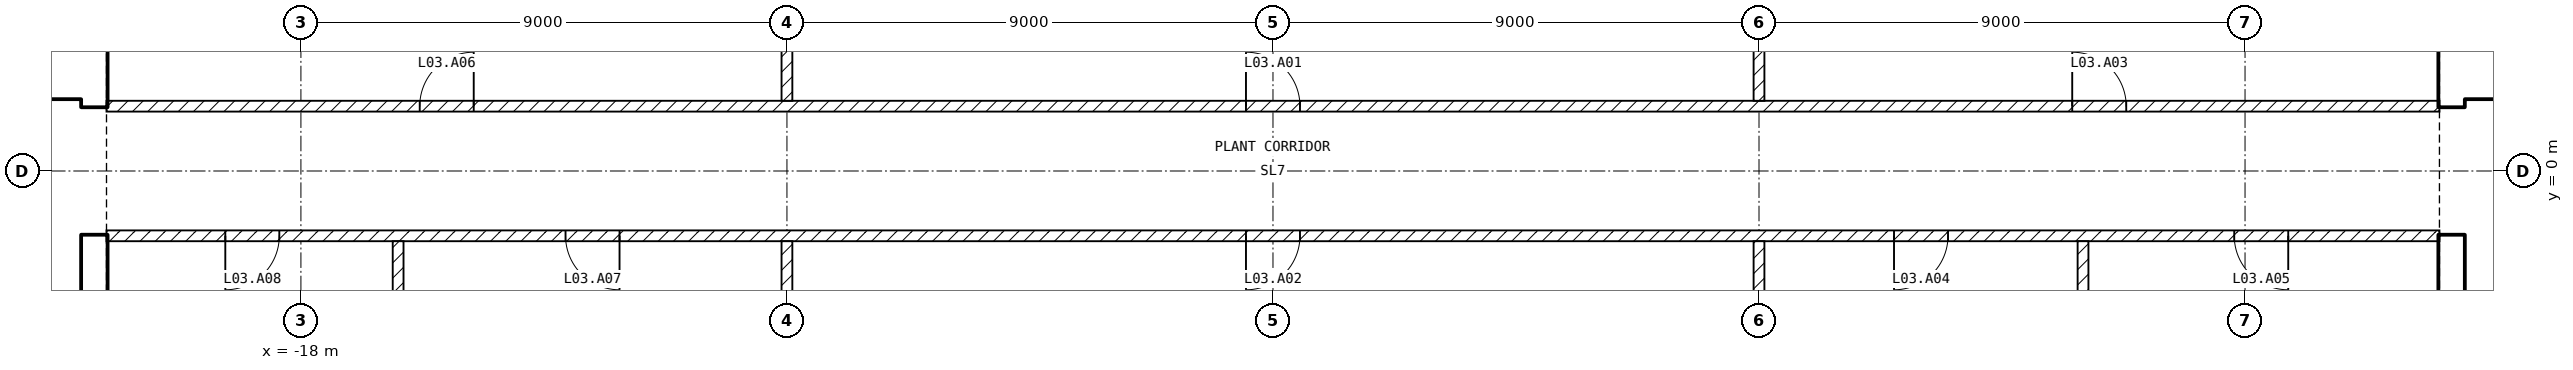
"""IFC4 building model, lengths in metres.
Left out: names, types, materials, properties, quantities, classifications, styles, units other than length and angle.
Written with IfcOpenShell. Run it as: python <this file> out.ifc"""

import sys

from ifc_helpers import new_model, si_unit, direction, frame, frame_2d, origin, place, context, subcontext, project, spatial, rectangle, extrude, element, fill, save


model = new_model("IFC4")
c1 = context("Model", 3, precision=1e-05, world=origin(), true_north=direction((0.0, 1.0)))
c2 = subcontext(c1, "Body", "Model", "MODEL_VIEW")
j1 = project(units=[si_unit("LENGTHUNIT", "METRE"), si_unit("PLANEANGLEUNIT", "RADIAN")], contexts=[c1])
p1 = place(None, origin())
s1 = spatial("IfcSite", under=j1, at=p1, CompositionType="ELEMENT")
p2 = place(p1, origin())
s2 = spatial("IfcBuilding", under=s1, at=p2, CompositionType="ELEMENT")
p3 = place(p2, frame((0.0, 0.0, 27.0)))
s3 = spatial("IfcBuildingStorey", under=s2, at=p3, CompositionType="ELEMENT", Elevation=27.0)
for number, where, z_axis, x_axis in (
    (1, (21.825, -8.1, 0.0), (0.0, 0.0, 1.0), (0.0, 1.0, 0.0)),
    (2, (21.825, 1.2, 0.0), (0.0, 0.0, 1.0), (0.0, 1.0, 0.0)),
):
    element("IfcWall", number, at=place(p3, frame(where, z_axis=z_axis, x_axis=x_axis)), inside=s3, PredefinedType="SHEAR", context=c2, shape_type="SweptSolid", body=[
        extrude(rectangle(XDim=6.9, YDim=0.45, at=frame_2d((3.45, 0.0))), origin(), (0.0, 0.0, 1.0), 4.7),
    ])
p4 = place(p3, frame((22.05, 1.45, 0.0), z_axis=(0.0, 0.0, 1.0), x_axis=(1.0, 0.0, 0.0)))
e3 = element("IfcWall", 3, at=p4, inside=s3, PredefinedType="SOLIDWALL", context=c2, shape_type="SweptSolid", body=[
    extrude(rectangle(XDim=13.05, YDim=0.2, at=frame_2d((6.525, 0.0))), origin(), (0.0, 0.0, 1.0), 4.7),
])
p5 = place(p4, frame((0.75, 0.0, 0.0)))
e4 = element("IfcOpeningElement", 4, at=p5, cuts=e3, PredefinedType="OPENING", context=c2, shape_type="SweptSolid", body=[
    extrude(rectangle(XDim=1.0, YDim=2.1, at=frame_2d((0.5, 1.05))), frame((0.0, 0.11, 0.0), z_axis=(0.0, -1.0, 0.0), x_axis=(1.0, 0.0, 0.0)), (0.0, 0.0, 1.0), 0.22),
])
p6 = place(p4, frame((3.25, 0.0, 0.0)))
e5 = element("IfcOpeningElement", 5, at=p6, cuts=e3, PredefinedType="OPENING", context=c2, shape_type="SweptSolid", body=[
    extrude(rectangle(XDim=1.0, YDim=2.1, at=frame_2d((0.5, 1.05))), frame((0.0, 0.11, 0.0), z_axis=(0.0, -1.0, 0.0), x_axis=(1.0, 0.0, 0.0)), (0.0, 0.0, 1.0), 0.22),
])
for number, where, z_axis, x_axis in (
    (6, (-21.825, -8.1, 0.0), (0.0, 0.0, 1.0), (0.0, 1.0, 0.0)),
    (7, (-21.825, 1.2, 0.0), (0.0, 0.0, 1.0), (0.0, 1.0, 0.0)),
):
    element("IfcWall", number, at=place(p3, frame(where, z_axis=z_axis, x_axis=x_axis)), inside=s3, PredefinedType="SHEAR", context=c2, shape_type="SweptSolid", body=[
        extrude(rectangle(XDim=6.9, YDim=0.45, at=frame_2d((3.45, 0.0))), origin(), (0.0, 0.0, 1.0), 4.7),
    ])
p7 = place(p3, frame((-35.1, 1.45, 0.0), z_axis=(0.0, 0.0, 1.0), x_axis=(1.0, 0.0, 0.0)))
e8 = element("IfcWall", 8, at=p7, inside=s3, PredefinedType="SOLIDWALL", context=c2, shape_type="SweptSolid", body=[
    extrude(rectangle(XDim=13.05, YDim=0.2, at=frame_2d((6.525, 0.0))), origin(), (0.0, 0.0, 1.0), 4.7),
])
p8 = place(p7, frame((11.3, 0.0, 0.0)))
e9 = element("IfcOpeningElement", 9, at=p8, cuts=e8, PredefinedType="OPENING", context=c2, shape_type="SweptSolid", body=[
    extrude(rectangle(XDim=1.0, YDim=2.1, at=frame_2d((0.5, 1.05))), frame((0.0, 0.11, 0.0), z_axis=(0.0, -1.0, 0.0), x_axis=(1.0, 0.0, 0.0)), (0.0, 0.0, 1.0), 0.22),
])
p9 = place(p7, frame((8.8, 0.0, 0.0)))
e10 = element("IfcOpeningElement", 10, at=p9, cuts=e8, PredefinedType="OPENING", context=c2, shape_type="SweptSolid", body=[
    extrude(rectangle(XDim=1.0, YDim=2.1, at=frame_2d((0.5, 1.05))), frame((0.0, 0.11, 0.0), z_axis=(0.0, -1.0, 0.0), x_axis=(1.0, 0.0, 0.0)), (0.0, 0.0, 1.0), 0.22),
])
p10 = place(p3, frame((-21.6, 1.2, 0.0), z_axis=(0.0, 0.0, 1.0), x_axis=(1.0, 0.0, 0.0)))
e11 = element("IfcWall", 11, at=p10, inside=s3, PredefinedType="PARTITIONING", context=c2, shape_type="SweptSolid", body=[
    extrude(rectangle(XDim=43.2, YDim=0.2, at=frame_2d((21.6, 0.0))), origin(), (0.0, 0.0, 1.0), 4.7),
])
p11 = place(p10, frame((21.1, 0.0, 0.0)))
e12 = element("IfcOpeningElement", 12, at=p11, cuts=e11, PredefinedType="OPENING", context=c2, shape_type="SweptSolid", body=[
    extrude(rectangle(XDim=1.0, YDim=2.1, at=frame_2d((0.5, 1.05))), frame((0.0, 0.11, 0.0), z_axis=(0.0, -1.0, 0.0), x_axis=(1.0, 0.0, 0.0)), (0.0, 0.0, 1.0), 0.22),
])
p12 = place(p10, frame((36.4, 0.0, 0.0)))
e13 = element("IfcOpeningElement", 13, at=p12, cuts=e11, PredefinedType="OPENING", context=c2, shape_type="SweptSolid", body=[
    extrude(rectangle(XDim=1.0, YDim=2.1, at=frame_2d((0.5, 1.05))), frame((0.0, 0.11, 0.0), z_axis=(0.0, -1.0, 0.0), x_axis=(1.0, 0.0, 0.0)), (0.0, 0.0, 1.0), 0.22),
])
p13 = place(p10, frame((5.8, 0.0, 0.0)))
e14 = element("IfcOpeningElement", 14, at=p13, cuts=e11, PredefinedType="OPENING", context=c2, shape_type="SweptSolid", body=[
    extrude(rectangle(XDim=1.0, YDim=2.1, at=frame_2d((0.5, 1.05))), frame((0.0, 0.11, 0.0), z_axis=(0.0, -1.0, 0.0), x_axis=(1.0, 0.0, 0.0)), (0.0, 0.0, 1.0), 0.22),
])
p14 = place(p3, frame((21.6, -1.2, 0.0), z_axis=(0.0, 0.0, 1.0), x_axis=(-1.0, 0.0, 0.0)))
e15 = element("IfcWall", 15, at=p14, inside=s3, PredefinedType="PARTITIONING", context=c2, shape_type="SweptSolid", body=[
    extrude(rectangle(XDim=43.2, YDim=0.2, at=frame_2d((21.6, 0.0))), origin(), (0.0, 0.0, 1.0), 4.7),
])
p15 = place(p14, frame((21.1, 0.0, 0.0)))
e16 = element("IfcOpeningElement", 16, at=p15, cuts=e15, PredefinedType="OPENING", context=c2, shape_type="SweptSolid", body=[
    extrude(rectangle(XDim=1.0, YDim=2.1, at=frame_2d((0.5, 1.05))), frame((0.0, 0.11, 0.0), z_axis=(0.0, -1.0, 0.0), x_axis=(1.0, 0.0, 0.0)), (0.0, 0.0, 1.0), 0.22),
])
p16 = place(p14, frame((9.1, 0.0, 0.0)))
e17 = element("IfcOpeningElement", 17, at=p16, cuts=e15, PredefinedType="OPENING", context=c2, shape_type="SweptSolid", body=[
    extrude(rectangle(XDim=1.0, YDim=2.1, at=frame_2d((0.5, 1.05))), frame((0.0, 0.11, 0.0), z_axis=(0.0, -1.0, 0.0), x_axis=(1.0, 0.0, 0.0)), (0.0, 0.0, 1.0), 0.22),
])
p17 = place(p14, frame((2.8, 0.0, 0.0)))
e18 = element("IfcOpeningElement", 18, at=p17, cuts=e15, PredefinedType="OPENING", context=c2, shape_type="SweptSolid", body=[
    extrude(rectangle(XDim=1.0, YDim=2.1, at=frame_2d((0.5, 1.05))), frame((0.0, 0.11, 0.0), z_axis=(0.0, -1.0, 0.0), x_axis=(1.0, 0.0, 0.0)), (0.0, 0.0, 1.0), 0.22),
])
p18 = place(p14, frame((33.7, 0.0, 0.0)))
e19 = element("IfcOpeningElement", 19, at=p18, cuts=e15, PredefinedType="OPENING", context=c2, shape_type="SweptSolid", body=[
    extrude(rectangle(XDim=1.0, YDim=2.1, at=frame_2d((0.5, 1.05))), frame((0.0, 0.11, 0.0), z_axis=(0.0, -1.0, 0.0), x_axis=(1.0, 0.0, 0.0)), (0.0, 0.0, 1.0), 0.22),
])
p19 = place(p14, frame((40.0, 0.0, 0.0)))
e20 = element("IfcOpeningElement", 20, at=p19, cuts=e15, PredefinedType="OPENING", context=c2, shape_type="SweptSolid", body=[
    extrude(rectangle(XDim=1.0, YDim=2.1, at=frame_2d((0.5, 1.05))), frame((0.0, 0.11, 0.0), z_axis=(0.0, -1.0, 0.0), x_axis=(1.0, 0.0, 0.0)), (0.0, 0.0, 1.0), 0.22),
])
for number, where, z_axis, x_axis in (
    (21, (9.0, 8.7, 0.0), (0.0, 0.0, 1.0), (0.0, -1.0, 0.0)),
    (22, (-9.0, 1.3, 0.0), (0.0, 0.0, 1.0), (0.0, 1.0, 0.0)),
    (23, (9.0, -1.3, 0.0), (0.0, 0.0, 1.0), (0.0, -1.0, 0.0)),
    (24, (-9.0, -8.7, 0.0), (0.0, 0.0, 1.0), (0.0, 1.0, 0.0)),
    (25, (15.0, -1.3, 0.0), (0.0, 0.0, 1.0), (0.0, -1.0, 0.0)),
    (26, (-16.2, -8.7, 0.0), (0.0, 0.0, 1.0), (0.0, 1.0, 0.0)),
):
    element("IfcWall", number, at=place(p3, frame(where, z_axis=z_axis, x_axis=x_axis)), inside=s3, PredefinedType="PARTITIONING", context=c2, shape_type="SweptSolid", body=[
        extrude(rectangle(XDim=7.4, YDim=0.2, at=frame_2d((3.7, 0.0))), origin(), (0.0, 0.0, 1.0), 4.7),
    ])
p20 = place(p11, origin())
e27 = element("IfcDoor", 27, at=p20, inside=s3, OperationType="SINGLE_SWING_LEFT", PredefinedType="DOOR", context=c2, shape_type="SweptSolid", body=[
    extrude(rectangle(XDim=1.0, YDim=2.1, at=frame_2d((0.5, 1.05))), frame((0.0, 0.025, 0.0), z_axis=(0.0, -1.0, 0.0), x_axis=(1.0, 0.0, 0.0)), (0.0, 0.0, 1.0), 0.05),
])
fill(e12, e27)
p21 = place(p15, origin())
e28 = element("IfcDoor", 28, at=p21, inside=s3, OperationType="SINGLE_SWING_RIGHT", PredefinedType="DOOR", context=c2, shape_type="SweptSolid", body=[
    extrude(rectangle(XDim=1.0, YDim=2.1, at=frame_2d((0.5, 1.05))), frame((0.0, 0.025, 0.0), z_axis=(0.0, -1.0, 0.0), x_axis=(1.0, 0.0, 0.0)), (0.0, 0.0, 1.0), 0.05),
])
fill(e16, e28)
p22 = place(p12, origin())
e29 = element("IfcDoor", 29, at=p22, inside=s3, OperationType="SINGLE_SWING_LEFT", PredefinedType="DOOR", context=c2, shape_type="SweptSolid", body=[
    extrude(rectangle(XDim=1.0, YDim=2.1, at=frame_2d((0.5, 1.05))), frame((0.0, 0.025, 0.0), z_axis=(0.0, -1.0, 0.0), x_axis=(1.0, 0.0, 0.0)), (0.0, 0.0, 1.0), 0.05),
])
fill(e13, e29)
p23 = place(p16, origin())
e30 = element("IfcDoor", 30, at=p23, inside=s3, OperationType="SINGLE_SWING_RIGHT", PredefinedType="DOOR", context=c2, shape_type="SweptSolid", body=[
    extrude(rectangle(XDim=1.0, YDim=2.1, at=frame_2d((0.5, 1.05))), frame((0.0, 0.025, 0.0), z_axis=(0.0, -1.0, 0.0), x_axis=(1.0, 0.0, 0.0)), (0.0, 0.0, 1.0), 0.05),
])
fill(e17, e30)
p24 = place(p17, origin())
e31 = element("IfcDoor", 31, at=p24, inside=s3, OperationType="SINGLE_SWING_LEFT", PredefinedType="DOOR", context=c2, shape_type="SweptSolid", body=[
    extrude(rectangle(XDim=1.0, YDim=2.1, at=frame_2d((0.5, 1.05))), frame((0.0, 0.025, 0.0), z_axis=(0.0, -1.0, 0.0), x_axis=(1.0, 0.0, 0.0)), (0.0, 0.0, 1.0), 0.05),
])
fill(e18, e31)
p25 = place(p13, origin())
e32 = element("IfcDoor", 32, at=p25, inside=s3, OperationType="SINGLE_SWING_RIGHT", PredefinedType="DOOR", context=c2, shape_type="SweptSolid", body=[
    extrude(rectangle(XDim=1.0, YDim=2.1, at=frame_2d((0.5, 1.05))), frame((0.0, 0.025, 0.0), z_axis=(0.0, -1.0, 0.0), x_axis=(1.0, 0.0, 0.0)), (0.0, 0.0, 1.0), 0.05),
])
fill(e14, e32)
p26 = place(p18, origin())
e33 = element("IfcDoor", 33, at=p26, inside=s3, OperationType="SINGLE_SWING_LEFT", PredefinedType="DOOR", context=c2, shape_type="SweptSolid", body=[
    extrude(rectangle(XDim=1.0, YDim=2.1, at=frame_2d((0.5, 1.05))), frame((0.0, 0.025, 0.0), z_axis=(0.0, -1.0, 0.0), x_axis=(1.0, 0.0, 0.0)), (0.0, 0.0, 1.0), 0.05),
])
fill(e19, e33)
p27 = place(p19, origin())
e34 = element("IfcDoor", 34, at=p27, inside=s3, OperationType="SINGLE_SWING_RIGHT", PredefinedType="DOOR", context=c2, shape_type="SweptSolid", body=[
    extrude(rectangle(XDim=1.0, YDim=2.1, at=frame_2d((0.5, 1.05))), frame((0.0, 0.025, 0.0), z_axis=(0.0, -1.0, 0.0), x_axis=(1.0, 0.0, 0.0)), (0.0, 0.0, 1.0), 0.05),
])
fill(e20, e34)
save(model, sys.argv[1])
